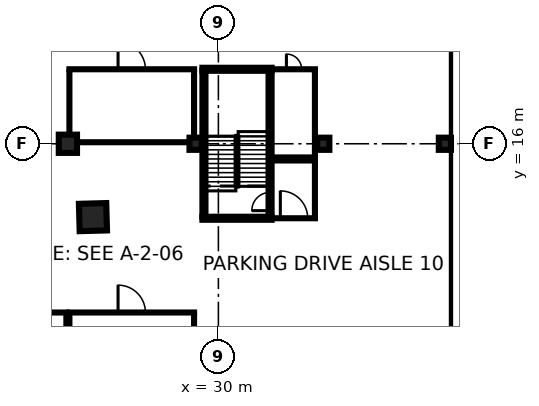
"""IFC4 building model, lengths in metres.
Left out: names, types, materials, properties, quantities, classifications, styles, units other than length and angle.
Written with IfcOpenShell. Run it as: python <this file> out.ifc"""

import sys

from ifc_helpers import new_model, si_unit, direction, frame, frame_2d, origin, origin_2d, place, context, subcontext, project, spatial, rectangle, extrude, element, fill, save


model = new_model("IFC4")
c1 = context("Model", 3, precision=1e-05, world=origin(), true_north=direction((0.0, 1.0)))
c2 = subcontext(c1, "Body", "Model", "MODEL_VIEW")
j1 = project(units=[si_unit("LENGTHUNIT", "METRE"), si_unit("PLANEANGLEUNIT", "RADIAN")], contexts=[c1])
p1 = place(None, origin())
s1 = spatial("IfcSite", under=j1, at=p1, CompositionType="ELEMENT")
p2 = place(p1, origin())
s2 = spatial("IfcBuilding", under=s1, at=p2, CompositionType="ELEMENT")
p3 = place(p2, frame((0.0, 0.0, -12.0)))
s3 = spatial("IfcBuildingStorey", under=s2, at=p3, CompositionType="ELEMENT", Elevation=-12.0)
p4 = place(p3, frame((45.75, -80.0, 0.0), z_axis=(0.0, 0.0, 1.0), x_axis=(0.0, 1.0, 0.0)))
e1 = element("IfcWall", 1, at=p4, inside=s3, PredefinedType="USERDEFINED", context=c2, shape_type="SweptSolid", body=[
    extrude(rectangle(XDim=160.0, YDim=0.9, at=frame_2d((80.0, 0.0))), origin(), (0.0, 0.0, 1.0), 11.55),
])
p5 = place(p2, frame((0.0, 0.0, -7.2)))
s4 = spatial("IfcBuildingStorey", under=s2, at=p5, CompositionType="ELEMENT", Elevation=-7.2)
p6 = place(p5, frame((21.749, 11.174, -0.4), z_axis=(0.0, 0.0, 1.0), x_axis=(0.999628128016, 0.02726913418, 0.0)))
e2 = element("IfcColumn", 2, at=p6, inside=s4, PredefinedType="COLUMN", context=c2, shape_type="SweptSolid", body=[
    extrude(rectangle(XDim=1.8, YDim=1.8, at=origin_2d()), origin(), (0.0, 0.0, 1.0), 3.6),
])
p7 = place(p5, frame((20.1, 16.0, -0.4), z_axis=(0.0, 0.0, 1.0), x_axis=(1.0, 0.0, 0.0)))
e3 = element("IfcColumn", 3, at=p7, inside=s4, PredefinedType="COLUMN", context=c2, shape_type="SweptSolid", body=[
    extrude(rectangle(XDim=1.2, YDim=1.2, at=origin_2d()), origin(), (0.0, 0.0, 1.0), 3.6),
])
for number, where, z_axis, x_axis in (
    (4, (28.5, 16.0, -0.4), (0.0, 0.0, 1.0), (1.0, 0.0, 0.0)),
    (5, (36.9, 16.0, -0.4), (0.0, 0.0, 1.0), (1.0, 0.0, 0.0)),
    (6, (44.9, 16.0, -0.4), (0.0, 0.0, 1.0), (1.0, 0.0, 0.0)),
):
    element("IfcColumn", number, at=place(p5, frame(where, z_axis=z_axis, x_axis=x_axis)), inside=s4, PredefinedType="COLUMN", context=c2, shape_type="SweptSolid", body=[
        extrude(rectangle(XDim=0.8, YDim=0.8, at=origin_2d()), origin(), (0.0, 0.0, 1.0), 3.6),
    ])
p8 = place(p5, frame((3.3, 4.9, 0.0), z_axis=(0.0, 0.0, 1.0), x_axis=(1.0, 0.0, 0.0)))
e7 = element("IfcWall", 7, at=p8, inside=s4, PredefinedType="PARTITIONING", context=c2, shape_type="SweptSolid", body=[
    extrude(rectangle(XDim=16.8, YDim=0.2, at=frame_2d((8.4, 0.0))), origin(), (0.0, 0.0, 1.0), 3.2),
])
p9 = place(p8, frame((3.3, 0.0, 0.0)))
e8 = element("IfcOpeningElement", 8, at=p9, cuts=e7, PredefinedType="OPENING", context=c2, shape_type="SweptSolid", body=[
    extrude(rectangle(XDim=1.8, YDim=2.1, at=frame_2d((0.9, 1.05))), frame((0.0, 0.11, 0.0), z_axis=(0.0, -1.0, 0.0), x_axis=(1.0, 0.0, 0.0)), (0.0, 0.0, 1.0), 0.22),
])
p10 = place(p5, frame((20.0, 0.6, 0.0), z_axis=(0.0, 0.0, 1.0), x_axis=(0.0, 1.0, 0.0)))
e9 = element("IfcWall", 9, at=p10, inside=s4, PredefinedType="PARTITIONING", context=c2, shape_type="SweptSolid", body=[
    extrude(rectangle(XDim=4.2, YDim=0.2, at=frame_2d((2.1, 0.0))), origin(), (0.0, 0.0, 1.0), 3.2),
])
p11 = place(p5, frame((20.1, 4.9, 0.0), z_axis=(0.0, 0.0, 1.0), x_axis=(1.0, 0.0, 0.0)))
e10 = element("IfcWall", 10, at=p11, inside=s4, PredefinedType="PARTITIONING", context=c2, shape_type="SweptSolid", body=[
    extrude(rectangle(XDim=8.4, YDim=0.2, at=frame_2d((4.2, 0.0))), origin(), (0.0, 0.0, 1.0), 3.2),
])
p12 = place(p11, frame((3.3, 0.0, 0.0)))
e11 = element("IfcOpeningElement", 11, at=p12, cuts=e10, PredefinedType="OPENING", context=c2, shape_type="SweptSolid", body=[
    extrude(rectangle(XDim=1.8, YDim=2.1, at=frame_2d((0.9, 1.05))), frame((0.0, 0.11, 0.0), z_axis=(0.0, -1.0, 0.0), x_axis=(1.0, 0.0, 0.0)), (0.0, 0.0, 1.0), 0.22),
])
p13 = place(p5, frame((20.2, 0.6, 0.0), z_axis=(0.0, 0.0, 1.0), x_axis=(0.0, 1.0, 0.0)))
e12 = element("IfcWall", 12, at=p13, inside=s4, PredefinedType="PARTITIONING", context=c2, shape_type="SweptSolid", body=[
    extrude(rectangle(XDim=4.2, YDim=0.2, at=frame_2d((2.1, 0.0))), origin(), (0.0, 0.0, 1.0), 3.2),
])
p14 = place(p5, frame((28.4, 0.4, 0.0), z_axis=(0.0, 0.0, 1.0), x_axis=(0.0, 1.0, 0.0)))
e13 = element("IfcWall", 13, at=p14, inside=s4, PredefinedType="PARTITIONING", context=c2, shape_type="SweptSolid", body=[
    extrude(rectangle(XDim=4.4, YDim=0.2, at=frame_2d((2.2, 0.0))), origin(), (0.0, 0.0, 1.0), 3.2),
])
p15 = place(p5, frame((20.1, 16.1, 0.0), z_axis=(0.0, 0.0, 1.0), x_axis=(1.0, 0.0, 0.0)))
e14 = element("IfcWall", 14, at=p15, inside=s4, PredefinedType="PARTITIONING", context=c2, shape_type="SweptSolid", body=[
    extrude(rectangle(XDim=8.4, YDim=0.2, at=frame_2d((4.2, 0.0))), origin(), (0.0, 0.0, 1.0), 3.2),
])
p16 = place(p5, frame((20.1, 20.9, 0.0), z_axis=(0.0, 0.0, 1.0), x_axis=(1.0, 0.0, 0.0)))
e15 = element("IfcWall", 15, at=p16, inside=s4, PredefinedType="PARTITIONING", context=c2, shape_type="SweptSolid", body=[
    extrude(rectangle(XDim=8.4, YDim=0.2, at=frame_2d((4.2, 0.0))), origin(), (0.0, 0.0, 1.0), 3.2),
])
p17 = place(p16, frame((3.3, 0.0, 0.0)))
e16 = element("IfcOpeningElement", 16, at=p17, cuts=e15, PredefinedType="OPENING", context=c2, shape_type="SweptSolid", body=[
    extrude(rectangle(XDim=1.8, YDim=2.1, at=frame_2d((0.9, 1.05))), frame((0.0, 0.11, 0.0), z_axis=(0.0, -1.0, 0.0), x_axis=(1.0, 0.0, 0.0)), (0.0, 0.0, 1.0), 0.22),
])
p18 = place(p5, frame((20.2, 16.6, 0.0), z_axis=(0.0, 0.0, 1.0), x_axis=(0.0, 1.0, 0.0)))
e17 = element("IfcWall", 17, at=p18, inside=s4, PredefinedType="PARTITIONING", context=c2, shape_type="SweptSolid", body=[
    extrude(rectangle(XDim=4.2, YDim=0.2, at=frame_2d((2.1, 0.0))), origin(), (0.0, 0.0, 1.0), 3.2),
])
p19 = place(p5, frame((28.4, 16.4, 0.0), z_axis=(0.0, 0.0, 1.0), x_axis=(0.0, 1.0, 0.0)))
e18 = element("IfcWall", 18, at=p19, inside=s4, PredefinedType="PARTITIONING", context=c2, shape_type="SweptSolid", body=[
    extrude(rectangle(XDim=4.4, YDim=0.2, at=frame_2d((2.2, 0.0))), origin(), (0.0, 0.0, 1.0), 3.2),
])
p20 = place(p5, frame((33.5, 11.1, 0.0), z_axis=(0.0, 0.0, 1.0), x_axis=(1.0, 0.0, 0.0)))
e19 = element("IfcWall", 19, at=p20, inside=s4, PredefinedType="PARTITIONING", context=c2, shape_type="SweptSolid", body=[
    extrude(rectangle(XDim=2.95, YDim=0.2, at=frame_2d((1.475, 0.0))), origin(), (0.0, 0.0, 1.0), 3.2),
])
p21 = place(p20, frame((0.575, 0.0, 0.0)))
e20 = element("IfcOpeningElement", 20, at=p21, cuts=e19, PredefinedType="OPENING", context=c2, shape_type="SweptSolid", body=[
    extrude(rectangle(XDim=1.8, YDim=2.1, at=frame_2d((0.9, 1.05))), frame((0.0, 0.11, 0.0), z_axis=(0.0, -1.0, 0.0), x_axis=(1.0, 0.0, 0.0)), (0.0, 0.0, 1.0), 0.22),
])
p22 = place(p5, frame((33.5, 14.9, 0.0), z_axis=(0.0, 0.0, 1.0), x_axis=(1.0, 0.0, 0.0)))
e21 = element("IfcWall", 21, at=p22, inside=s4, PredefinedType="PARTITIONING", context=c2, shape_type="SweptSolid", body=[
    extrude(rectangle(XDim=2.95, YDim=0.2, at=frame_2d((1.475, 0.0))), origin(), (0.0, 0.0, 1.0), 3.2),
])
p23 = place(p5, frame((36.35, 11.2, 0.0), z_axis=(0.0, 0.0, 1.0), x_axis=(0.0, 1.0, 0.0)))
e22 = element("IfcWall", 22, at=p23, inside=s4, PredefinedType="PARTITIONING", context=c2, shape_type="SweptSolid", body=[
    extrude(rectangle(XDim=3.6, YDim=0.2, at=frame_2d((1.8, 0.0))), origin(), (0.0, 0.0, 1.0), 3.2),
])
p24 = place(p5, frame((33.5, 15.1, 0.0), z_axis=(0.0, 0.0, 1.0), x_axis=(1.0, 0.0, 0.0)))
e23 = element("IfcWall", 23, at=p24, inside=s4, PredefinedType="PARTITIONING", context=c2, shape_type="SweptSolid", body=[
    extrude(rectangle(XDim=2.95, YDim=0.2, at=frame_2d((1.475, 0.0))), origin(), (0.0, 0.0, 1.0), 3.2),
])
p25 = place(p5, frame((33.5, 20.9, 0.0), z_axis=(0.0, 0.0, 1.0), x_axis=(1.0, 0.0, 0.0)))
e24 = element("IfcWall", 24, at=p25, inside=s4, PredefinedType="PARTITIONING", context=c2, shape_type="SweptSolid", body=[
    extrude(rectangle(XDim=2.95, YDim=0.2, at=frame_2d((1.475, 0.0))), origin(), (0.0, 0.0, 1.0), 3.2),
])
p26 = place(p25, frame((0.975, 0.0, 0.0)))
e25 = element("IfcOpeningElement", 25, at=p26, cuts=e24, PredefinedType="OPENING", context=c2, shape_type="SweptSolid", body=[
    extrude(rectangle(XDim=1.0, YDim=2.1, at=frame_2d((0.5, 1.05))), frame((0.0, 0.11, 0.0), z_axis=(0.0, -1.0, 0.0), x_axis=(1.0, 0.0, 0.0)), (0.0, 0.0, 1.0), 0.22),
])
p27 = place(p5, frame((36.35, 15.2, 0.0), z_axis=(0.0, 0.0, 1.0), x_axis=(0.0, 1.0, 0.0)))
e26 = element("IfcWall", 26, at=p27, inside=s4, PredefinedType="PARTITIONING", context=c2, shape_type="SweptSolid", body=[
    extrude(rectangle(XDim=5.6, YDim=0.2, at=frame_2d((2.8, 0.0))), origin(), (0.0, 0.0, 1.0), 3.2),
])
p28 = place(p5, frame((29.05, 11.2, 0.0), z_axis=(0.0, 0.0, 1.0), x_axis=(0.0, 1.0, 0.0)))
e27 = element("IfcWall", 27, at=p28, inside=s4, PredefinedType="SOLIDWALL", context=c2, shape_type="SweptSolid", body=[
    extrude(rectangle(XDim=9.6, YDim=0.2, at=frame_2d((4.8, 0.0))), origin(), (0.0, 0.0, 1.0), 3.2),
])
p29 = place(p5, frame((33.4, 11.2, 0.0), z_axis=(0.0, 0.0, 1.0), x_axis=(0.0, 1.0, 0.0)))
e28 = element("IfcWall", 28, at=p29, inside=s4, PredefinedType="SOLIDWALL", context=c2, shape_type="SweptSolid", body=[
    extrude(rectangle(XDim=9.6, YDim=0.2, at=frame_2d((4.8, 0.0))), origin(), (0.0, 0.0, 1.0), 3.2),
])
p30 = place(p29, frame((0.4, 0.0, 0.0)))
e29 = element("IfcOpeningElement", 29, at=p30, cuts=e28, PredefinedType="OPENING", context=c2, shape_type="SweptSolid", body=[
    extrude(rectangle(XDim=1.2, YDim=2.1, at=frame_2d((0.6, 1.05))), frame((0.0, 0.11, 0.0), z_axis=(0.0, -1.0, 0.0), x_axis=(1.0, 0.0, 0.0)), (0.0, 0.0, 1.0), 0.22),
])
for number, where, z_axis, x_axis in (
    (30, (33.5, 11.1, 0.0), (0.0, 0.0, 1.0), (-1.0, 0.0, 0.0)),
    (31, (28.95, 20.9, 0.0), (0.0, 0.0, 1.0), (1.0, 0.0, 0.0)),
):
    element("IfcWall", number, at=place(p5, frame(where, z_axis=z_axis, x_axis=x_axis)), inside=s4, PredefinedType="SOLIDWALL", context=c2, shape_type="SweptSolid", body=[
        extrude(rectangle(XDim=4.55, YDim=0.2, at=frame_2d((2.275, 0.0))), origin(), (0.0, 0.0, 1.0), 3.2),
    ])
p31 = place(p12, origin())
e32 = element("IfcDoor", 32, at=p31, inside=s4, OperationType="DOUBLE_DOOR_SINGLE_SWING", PredefinedType="DOOR", context=c2, shape_type="SweptSolid", body=[
    extrude(rectangle(XDim=1.8, YDim=2.1, at=frame_2d((0.9, 1.05))), frame((0.0, 0.025, 0.0), z_axis=(0.0, -1.0, 0.0), x_axis=(1.0, 0.0, 0.0)), (0.0, 0.0, 1.0), 0.05),
])
fill(e11, e32)
p32 = place(p17, origin())
e33 = element("IfcDoor", 33, at=p32, inside=s4, OperationType="DOUBLE_DOOR_SINGLE_SWING", PredefinedType="DOOR", context=c2, shape_type="SweptSolid", body=[
    extrude(rectangle(XDim=1.8, YDim=2.1, at=frame_2d((0.9, 1.05))), frame((0.0, 0.025, 0.0), z_axis=(0.0, -1.0, 0.0), x_axis=(1.0, 0.0, 0.0)), (0.0, 0.0, 1.0), 0.05),
])
fill(e16, e33)
p33 = place(p21, origin())
e34 = element("IfcDoor", 34, at=p33, inside=s4, OperationType="DOUBLE_DOOR_SINGLE_SWING", PredefinedType="DOOR", context=c2, shape_type="SweptSolid", body=[
    extrude(rectangle(XDim=1.8, YDim=2.1, at=frame_2d((0.9, 1.05))), frame((0.0, 0.025, 0.0), z_axis=(0.0, -1.0, 0.0), x_axis=(1.0, 0.0, 0.0)), (0.0, 0.0, 1.0), 0.05),
])
fill(e20, e34)
p34 = place(p26, origin())
e35 = element("IfcDoor", 35, at=p34, inside=s4, OperationType="SINGLE_SWING_LEFT", PredefinedType="DOOR", context=c2, shape_type="SweptSolid", body=[
    extrude(rectangle(XDim=1.0, YDim=2.1, at=frame_2d((0.5, 1.05))), frame((0.0, 0.025, 0.0), z_axis=(0.0, -1.0, 0.0), x_axis=(1.0, 0.0, 0.0)), (0.0, 0.0, 1.0), 0.05),
])
fill(e25, e35)
p35 = place(p30, origin())
e36 = element("IfcDoor", 36, at=p35, inside=s4, OperationType="SINGLE_SWING_LEFT", PredefinedType="DOOR", context=c2, shape_type="SweptSolid", body=[
    extrude(rectangle(XDim=1.2, YDim=2.1, at=frame_2d((0.6, 1.05))), frame((0.0, 0.025, 0.0), z_axis=(0.0, -1.0, 0.0), x_axis=(1.0, 0.0, 0.0)), (0.0, 0.0, 1.0), 0.05),
])
fill(e29, e36)
save(model, sys.argv[1])
